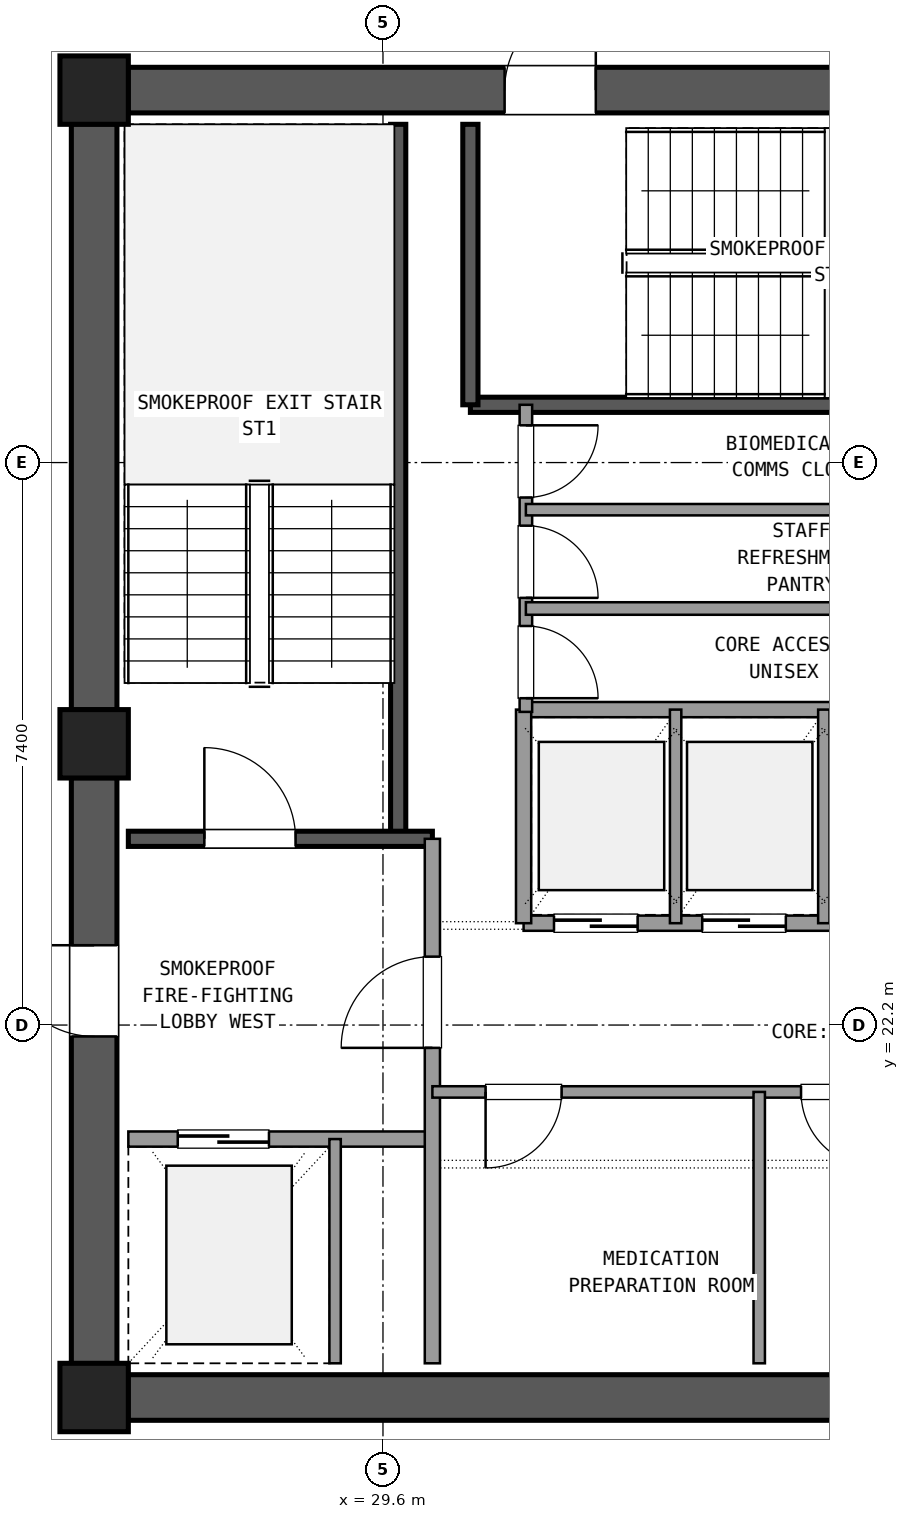
"""IFC4 building model, lengths in metres.
Left out: names, types, materials, properties, quantities, classifications, styles, units other than length and angle.
Written with IfcOpenShell. Run it as: python <this file> out.ifc"""

import sys

from ifc_helpers import new_model, si_unit, direction, frame, frame_2d, origin, origin_2d, place, context, subcontext, project, spatial, rectangle, extrude, element, fill, save


model = new_model("IFC4")
c1 = context("Model", 3, precision=1e-05, world=origin(), true_north=direction((0.0, 1.0)))
c2 = subcontext(c1, "Body", "Model", "MODEL_VIEW")
j1 = project(units=[si_unit("LENGTHUNIT", "METRE"), si_unit("PLANEANGLEUNIT", "RADIAN")], contexts=[c1])
p1 = place(None, origin())
s1 = spatial("IfcSite", under=j1, at=p1, CompositionType="ELEMENT")
p2 = place(p1, origin())
s2 = spatial("IfcBuilding", under=s1, at=p2, CompositionType="ELEMENT")
p3 = place(p2, frame((0.0, 0.0, 246.42)))
s3 = spatial("IfcBuildingStorey", under=s2, at=p3, CompositionType="ELEMENT", Elevation=246.42)
for number, where, z_axis, x_axis in (
    (1, (25.8, 17.3, 0.0), (0.0, 0.0, 1.0), (1.0, 0.0, 0.0)),
    (2, (25.8, 34.5, 0.0), (0.0, 0.0, 1.0), (1.0, 0.0, 0.0)),
    (3, (25.8, 25.9, 0.0), (0.0, 0.0, 1.0), (1.0, 0.0, 0.0)),
):
    element("IfcColumn", number, at=place(p3, frame(where, z_axis=z_axis, x_axis=x_axis)), inside=s3, PredefinedType="COLUMN", context=c2, shape_type="SweptSolid", body=[
        extrude(rectangle(XDim=0.9, YDim=0.9, at=origin_2d()), origin(), (0.0, 0.0, 1.0), 3.6),
    ])
p4 = place(p3, frame((26.245, 17.3, 0.0), z_axis=(0.0, 0.0, 1.0), x_axis=(1.0, 0.0, 0.0)))
e4 = element("IfcWall", 4, at=p4, inside=s3, PredefinedType="SHEAR", context=c2, shape_type="SweptSolid", body=[
    extrude(rectangle(XDim=10.31, YDim=0.6, at=frame_2d((5.155, 0.0))), origin(), (0.0, 0.0, 1.0), 3.32),
])
p5 = place(p3, frame((36.555, 34.5, 0.0), z_axis=(0.0, 0.0, 1.0), x_axis=(-1.0, 0.0, 0.0)))
e5 = element("IfcWall", 5, at=p5, inside=s3, PredefinedType="SHEAR", context=c2, shape_type="SweptSolid", body=[
    extrude(rectangle(XDim=10.31, YDim=0.6, at=frame_2d((5.155, 0.0))), origin(), (0.0, 0.0, 1.0), 3.32),
])
p6 = place(p5, frame((4.155, 0.0, 0.0)))
e6 = element("IfcOpeningElement", 6, at=p6, cuts=e5, PredefinedType="OPENING", context=c2, shape_type="SweptSolid", body=[
    extrude(rectangle(XDim=1.2, YDim=2.15, at=frame_2d((0.6, 1.075))), frame((0.0, 0.31, 0.0), z_axis=(0.0, -1.0, 0.0), x_axis=(1.0, 0.0, 0.0)), (0.0, 0.0, 1.0), 0.62),
])
p7 = place(p3, frame((25.8, 34.055, 0.0), z_axis=(0.0, 0.0, 1.0), x_axis=(0.0, -1.0, 0.0)))
e7 = element("IfcWall", 7, at=p7, inside=s3, PredefinedType="SHEAR", context=c2, shape_type="SweptSolid", body=[
    extrude(rectangle(XDim=7.71, YDim=0.6, at=frame_2d((3.855, 0.0))), origin(), (0.0, 0.0, 1.0), 3.32),
])
p8 = place(p3, frame((25.8, 25.455, 0.0), z_axis=(0.0, 0.0, 1.0), x_axis=(0.0, -1.0, 0.0)))
e8 = element("IfcWall", 8, at=p8, inside=s3, PredefinedType="SHEAR", context=c2, shape_type="SweptSolid", body=[
    extrude(rectangle(XDim=7.71, YDim=0.6, at=frame_2d((3.855, 0.0))), origin(), (0.0, 0.0, 1.0), 3.32),
])
p9 = place(p8, frame((2.205, 0.0, 0.0)))
e9 = element("IfcOpeningElement", 9, at=p9, cuts=e8, PredefinedType="OPENING", context=c2, shape_type="SweptSolid", body=[
    extrude(rectangle(XDim=1.2, YDim=2.15, at=frame_2d((0.6, 1.075))), frame((0.0, 0.31, 0.0), z_axis=(0.0, -1.0, 0.0), x_axis=(1.0, 0.0, 0.0)), (0.0, 0.0, 1.0), 0.62),
])
p10 = place(p3, frame((29.8, 24.65, 0.0), z_axis=(0.0, 0.0, 1.0), x_axis=(0.0, 1.0, 0.0)))
e10 = element("IfcWall", 10, at=p10, inside=s3, PredefinedType="SHEAR", context=c2, shape_type="SweptSolid", body=[
    extrude(rectangle(XDim=9.4, YDim=0.2, at=frame_2d((4.7, 0.0))), origin(), (0.0, 0.0, 1.0), 3.32),
])
p11 = place(p3, frame((26.25, 24.65, 0.0), z_axis=(0.0, 0.0, 1.0), x_axis=(1.0, 0.0, 0.0)))
e11 = element("IfcWall", 11, at=p11, inside=s3, PredefinedType="SHEAR", context=c2, shape_type="SweptSolid", body=[
    extrude(rectangle(XDim=4.0, YDim=0.2, at=frame_2d((2.0, 0.0))), origin(), (0.0, 0.0, 1.0), 3.32),
])
p12 = place(p11, frame((1.0, 0.0, 0.0)))
e12 = element("IfcOpeningElement", 12, at=p12, cuts=e11, PredefinedType="OPENING", context=c2, shape_type="SweptSolid", body=[
    extrude(rectangle(XDim=1.2, YDim=2.15, at=frame_2d((0.6, 1.075))), frame((0.0, 0.11, 0.0), z_axis=(0.0, -1.0, 0.0), x_axis=(1.0, 0.0, 0.0)), (0.0, 0.0, 1.0), 0.22),
])
p13 = place(p3, frame((30.75, 30.36, 0.0), z_axis=(0.0, 0.0, 1.0), x_axis=(1.0, 0.0, 0.0)))
e13 = element("IfcWall", 13, at=p13, inside=s3, PredefinedType="SHEAR", context=c2, shape_type="SweptSolid", body=[
    extrude(rectangle(XDim=9.5, YDim=0.2, at=frame_2d((4.75, 0.0))), origin(), (0.0, 0.0, 1.0), 3.32),
])
p14 = place(p3, frame((30.75, 30.36, 0.0), z_axis=(0.0, 0.0, 1.0), x_axis=(0.0, 1.0, 0.0)))
e14 = element("IfcWall", 14, at=p14, inside=s3, PredefinedType="SHEAR", context=c2, shape_type="SweptSolid", body=[
    extrude(rectangle(XDim=3.69, YDim=0.2, at=frame_2d((1.845, 0.0))), origin(), (0.0, 0.0, 1.0), 3.32),
])
p15 = place(p3, frame((26.25, 20.7, 0.0), z_axis=(0.0, 0.0, 1.0), x_axis=(1.0, 0.0, 0.0)))
e15 = element("IfcWall", 15, at=p15, inside=s3, PredefinedType="SOLIDWALL", context=c2, shape_type="SweptSolid", body=[
    extrude(rectangle(XDim=4.0, YDim=0.2, at=frame_2d((2.0, 0.0))), origin(), (0.0, 0.0, 1.0), 2.61),
])
p16 = place(p15, frame((0.65, 0.0, 0.0)))
e16 = element("IfcOpeningElement", 16, at=p16, cuts=e15, PredefinedType="OPENING", context=c2, shape_type="SweptSolid", body=[
    extrude(rectangle(XDim=1.2, YDim=2.15, at=frame_2d((0.6, 1.075))), frame((0.0, 0.11, 0.0), z_axis=(0.0, -1.0, 0.0), x_axis=(1.0, 0.0, 0.0)), (0.0, 0.0, 1.0), 0.22),
])
p17 = place(p3, frame((30.25, 17.75, 0.0), z_axis=(0.0, 0.0, 1.0), x_axis=(0.0, 1.0, 0.0)))
e17 = element("IfcWall", 17, at=p17, inside=s3, PredefinedType="SOLIDWALL", context=c2, shape_type="SweptSolid", body=[
    extrude(rectangle(XDim=6.9, YDim=0.2, at=frame_2d((3.45, 0.0))), origin(), (0.0, 0.0, 1.0), 2.61),
])
p18 = place(p17, frame((4.15, 0.0, 0.0)))
e18 = element("IfcOpeningElement", 18, at=p18, cuts=e17, PredefinedType="OPENING", context=c2, shape_type="SweptSolid", body=[
    extrude(rectangle(XDim=1.2, YDim=2.15, at=frame_2d((0.6, 1.075))), frame((0.0, 0.11, 0.0), z_axis=(0.0, -1.0, 0.0), x_axis=(1.0, 0.0, 0.0)), (0.0, 0.0, 1.0), 0.22),
])
p19 = place(p3, frame((28.97, 17.75, 0.0), z_axis=(0.0, 0.0, 1.0), x_axis=(0.0, 1.0, 0.0)))
e19 = element("IfcWall", 19, at=p19, inside=s3, PredefinedType="PARTITIONING", context=c2, shape_type="SweptSolid", body=[
    extrude(rectangle(XDim=2.95, YDim=0.15, at=frame_2d((1.475, 0.0))), origin(), (0.0, 0.0, 1.0), 2.61),
])
p20 = place(p3, frame((30.25, 21.32, 0.0), z_axis=(0.0, 0.0, 1.0), x_axis=(1.0, 0.0, 0.0)))
e20 = element("IfcWall", 20, at=p20, inside=s3, PredefinedType="PARTITIONING", context=c2, shape_type="SweptSolid", body=[
    extrude(rectangle(XDim=7.0, YDim=0.15, at=frame_2d((3.5, 0.0))), origin(), (0.0, 0.0, 1.0), 2.61),
])
p21 = place(p20, frame((0.7, 0.0, 0.0)))
e21 = element("IfcOpeningElement", 21, at=p21, cuts=e20, PredefinedType="OPENING", context=c2, shape_type="SweptSolid", body=[
    extrude(rectangle(XDim=1.0, YDim=2.15, at=frame_2d((0.5, 1.075))), frame((0.0, 0.085, 0.0), z_axis=(0.0, -1.0, 0.0), x_axis=(1.0, 0.0, 0.0)), (0.0, 0.0, 1.0), 0.17),
])
p22 = place(p20, frame((4.85, 0.0, 0.0)))
e22 = element("IfcOpeningElement", 22, at=p22, cuts=e20, PredefinedType="OPENING", context=c2, shape_type="SweptSolid", body=[
    extrude(rectangle(XDim=1.0, YDim=2.15, at=frame_2d((0.5, 1.075))), frame((0.0, 0.085, 0.0), z_axis=(0.0, -1.0, 0.0), x_axis=(1.0, 0.0, 0.0)), (0.0, 0.0, 1.0), 0.17),
])
p23 = place(p3, frame((34.55, 17.75, 0.0), z_axis=(0.0, 0.0, 1.0), x_axis=(0.0, 1.0, 0.0)))
e23 = element("IfcWall", 23, at=p23, inside=s3, PredefinedType="PARTITIONING", context=c2, shape_type="SweptSolid", body=[
    extrude(rectangle(XDim=3.57, YDim=0.15, at=frame_2d((1.785, 0.0))), origin(), (0.0, 0.0, 1.0), 2.61),
])
p24 = place(p3, frame((31.45, 23.54, 0.0), z_axis=(0.0, 0.0, 1.0), x_axis=(1.0, 0.0, 0.0)))
e24 = element("IfcWall", 24, at=p24, inside=s3, PredefinedType="SOLIDWALL", context=c2, shape_type="SweptSolid", body=[
    extrude(rectangle(XDim=5.9, YDim=0.2, at=frame_2d((2.95, 0.0))), origin(), (0.0, 0.0, 1.0), 2.61),
])
p25 = place(p24, frame((0.4, 0.0, 0.0)))
e25 = element("IfcOpeningElement", 25, at=p25, cuts=e24, PredefinedType="OPENING", context=c2, shape_type="SweptSolid", body=[
    extrude(rectangle(XDim=1.1, YDim=2.15, at=frame_2d((0.55, 1.075))), frame((0.0, 0.11, 0.0), z_axis=(0.0, -1.0, 0.0), x_axis=(1.0, 0.0, 0.0)), (0.0, 0.0, 1.0), 0.22),
])
p26 = place(p24, frame((2.35, 0.0, 0.0)))
e26 = element("IfcOpeningElement", 26, at=p26, cuts=e24, PredefinedType="OPENING", context=c2, shape_type="SweptSolid", body=[
    extrude(rectangle(XDim=1.1, YDim=2.15, at=frame_2d((0.55, 1.075))), frame((0.0, 0.11, 0.0), z_axis=(0.0, -1.0, 0.0), x_axis=(1.0, 0.0, 0.0)), (0.0, 0.0, 1.0), 0.22),
])
p27 = place(p24, frame((4.3, 0.0, 0.0)))
e27 = element("IfcOpeningElement", 27, at=p27, cuts=e24, PredefinedType="OPENING", context=c2, shape_type="SweptSolid", body=[
    extrude(rectangle(XDim=1.1, YDim=2.15, at=frame_2d((0.55, 1.075))), frame((0.0, 0.11, 0.0), z_axis=(0.0, -1.0, 0.0), x_axis=(1.0, 0.0, 0.0)), (0.0, 0.0, 1.0), 0.22),
])
p28 = place(p3, frame((31.45, 26.35, 0.0), z_axis=(0.0, 0.0, 1.0), x_axis=(1.0, 0.0, 0.0)))
e28 = element("IfcWall", 28, at=p28, inside=s3, PredefinedType="SOLIDWALL", context=c2, shape_type="SweptSolid", body=[
    extrude(rectangle(XDim=5.9, YDim=0.2, at=frame_2d((2.95, 0.0))), origin(), (0.0, 0.0, 1.0), 2.61),
])
p29 = place(p3, frame((31.45, 23.54, 0.0), z_axis=(0.0, 0.0, 1.0), x_axis=(0.0, 1.0, 0.0)))
e29 = element("IfcWall", 29, at=p29, inside=s3, PredefinedType="SOLIDWALL", context=c2, shape_type="SweptSolid", body=[
    extrude(rectangle(XDim=2.81, YDim=0.2, at=frame_2d((1.405, 0.0))), origin(), (0.0, 0.0, 1.0), 2.61),
])
for number, where, z_axis, x_axis in (
    (30, (33.45, 23.54, 0.0), (0.0, 0.0, 1.0), (0.0, 1.0, 0.0)),
    (31, (35.4, 23.54, 0.0), (0.0, 0.0, 1.0), (0.0, 1.0, 0.0)),
):
    element("IfcWall", number, at=place(p3, frame(where, z_axis=z_axis, x_axis=x_axis)), inside=s3, PredefinedType="PARTITIONING", context=c2, shape_type="SweptSolid", body=[
        extrude(rectangle(XDim=2.81, YDim=0.15, at=frame_2d((1.405, 0.0))), origin(), (0.0, 0.0, 1.0), 2.61),
    ])
p30 = place(p3, frame((31.48, 26.32, 0.0), z_axis=(0.0, 0.0, 1.0), x_axis=(0.0, 1.0, 0.0)))
e32 = element("IfcWall", 32, at=p30, inside=s3, PredefinedType="PLUMBINGWALL", context=c2, shape_type="SweptSolid", body=[
    extrude(rectangle(XDim=4.04, YDim=0.165, at=frame_2d((2.02, 0.0))), origin(), (0.0, 0.0, 1.0), 2.61),
])
p31 = place(p30, frame((0.18, 0.0, 0.0)))
e33 = element("IfcOpeningElement", 33, at=p31, cuts=e32, PredefinedType="OPENING", context=c2, shape_type="SweptSolid", body=[
    extrude(rectangle(XDim=0.95, YDim=2.1, at=frame_2d((0.475, 1.05))), frame((0.0, 0.093, 0.0), z_axis=(0.0, -1.0, 0.0), x_axis=(1.0, 0.0, 0.0)), (0.0, 0.0, 1.0), 0.185),
])
p32 = place(p30, frame((1.5, 0.0, 0.0)))
e34 = element("IfcOpeningElement", 34, at=p32, cuts=e32, PredefinedType="OPENING", context=c2, shape_type="SweptSolid", body=[
    extrude(rectangle(XDim=0.95, YDim=2.1, at=frame_2d((0.475, 1.05))), frame((0.0, 0.093, 0.0), z_axis=(0.0, -1.0, 0.0), x_axis=(1.0, 0.0, 0.0)), (0.0, 0.0, 1.0), 0.185),
])
p33 = place(p30, frame((2.82, 0.0, 0.0)))
e35 = element("IfcOpeningElement", 35, at=p33, cuts=e32, PredefinedType="OPENING", context=c2, shape_type="SweptSolid", body=[
    extrude(rectangle(XDim=0.95, YDim=2.1, at=frame_2d((0.475, 1.05))), frame((0.0, 0.093, 0.0), z_axis=(0.0, -1.0, 0.0), x_axis=(1.0, 0.0, 0.0)), (0.0, 0.0, 1.0), 0.185),
])
p34 = place(p3, frame((31.48, 27.68, 0.0), z_axis=(0.0, 0.0, 1.0), x_axis=(1.0, 0.0, 0.0)))
e36 = element("IfcWall", 36, at=p34, inside=s3, PredefinedType="PLUMBINGWALL", context=c2, shape_type="SweptSolid", body=[
    extrude(rectangle(XDim=5.87, YDim=0.165, at=frame_2d((2.935, 0.0))), origin(), (0.0, 0.0, 1.0), 2.61),
])
p35 = place(p3, frame((31.48, 28.98, 0.0), z_axis=(0.0, 0.0, 1.0), x_axis=(1.0, 0.0, 0.0)))
e37 = element("IfcWall", 37, at=p35, inside=s3, PredefinedType="PARTITIONING", context=c2, shape_type="SweptSolid", body=[
    extrude(rectangle(XDim=5.89, YDim=0.15, at=frame_2d((2.945, 0.0))), origin(), (0.0, 0.0, 1.0), 2.61),
])
p36 = place(p12, origin())
e38 = element("IfcDoor", 38, at=p36, inside=s3, OperationType="SINGLE_SWING_LEFT", PredefinedType="DOOR", context=c2, shape_type="SweptSolid", body=[
    extrude(rectangle(XDim=1.2, YDim=2.15, at=frame_2d((0.6, 1.075))), frame((0.0, 0.025, 0.0), z_axis=(0.0, -1.0, 0.0), x_axis=(1.0, 0.0, 0.0)), (0.0, 0.0, 1.0), 0.05),
])
fill(e12, e38)
p37 = place(p16, origin())
e39 = element("IfcDoor", 39, at=p37, inside=s3, OperationType="SLIDING_TO_LEFT", PredefinedType="DOOR", context=c2, shape_type="SweptSolid", body=[
    extrude(rectangle(XDim=1.2, YDim=2.15, at=frame_2d((0.6, 1.075))), frame((0.0, 0.025, 0.0), z_axis=(0.0, -1.0, 0.0), x_axis=(1.0, 0.0, 0.0)), (0.0, 0.0, 1.0), 0.05),
])
fill(e16, e39)
p38 = place(p18, origin())
e40 = element("IfcDoor", 40, at=p38, inside=s3, OperationType="SINGLE_SWING_LEFT", PredefinedType="DOOR", context=c2, shape_type="SweptSolid", body=[
    extrude(rectangle(XDim=1.2, YDim=2.15, at=frame_2d((0.6, 1.075))), frame((0.0, 0.025, 0.0), z_axis=(0.0, -1.0, 0.0), x_axis=(1.0, 0.0, 0.0)), (0.0, 0.0, 1.0), 0.05),
])
fill(e18, e40)
p39 = place(p9, frame((1.2, 0.0, 0.0), z_axis=(0.0, 0.0, 1.0), x_axis=(-1.0, 0.0, 0.0)))
e41 = element("IfcDoor", 41, at=p39, inside=s3, OperationType="SINGLE_SWING_LEFT", PredefinedType="DOOR", context=c2, shape_type="SweptSolid", body=[
    extrude(rectangle(XDim=1.2, YDim=2.15, at=frame_2d((0.6, 1.075))), frame((0.0, 0.025, 0.0), z_axis=(0.0, -1.0, 0.0), x_axis=(1.0, 0.0, 0.0)), (0.0, 0.0, 1.0), 0.05),
])
fill(e9, e41)
p40 = place(p6, frame((1.2, 0.0, 0.0), z_axis=(0.0, 0.0, 1.0), x_axis=(-1.0, 0.0, 0.0)))
e42 = element("IfcDoor", 42, at=p40, inside=s3, OperationType="SINGLE_SWING_LEFT", PredefinedType="DOOR", context=c2, shape_type="SweptSolid", body=[
    extrude(rectangle(XDim=1.2, YDim=2.15, at=frame_2d((0.6, 1.075))), frame((0.0, 0.025, 0.0), z_axis=(0.0, -1.0, 0.0), x_axis=(1.0, 0.0, 0.0)), (0.0, 0.0, 1.0), 0.05),
])
fill(e6, e42)
p41 = place(p21, frame((1.0, 0.0, 0.0), z_axis=(0.0, 0.0, 1.0), x_axis=(-1.0, 0.0, 0.0)))
e43 = element("IfcDoor", 43, at=p41, inside=s3, OperationType="SINGLE_SWING_LEFT", PredefinedType="DOOR", context=c2, shape_type="SweptSolid", body=[
    extrude(rectangle(XDim=1.0, YDim=2.15, at=frame_2d((0.5, 1.075))), frame((0.0, 0.025, 0.0), z_axis=(0.0, -1.0, 0.0), x_axis=(1.0, 0.0, 0.0)), (0.0, 0.0, 1.0), 0.05),
])
fill(e21, e43)
p42 = place(p22, frame((1.0, 0.0, 0.0), z_axis=(0.0, 0.0, 1.0), x_axis=(-1.0, 0.0, 0.0)))
e44 = element("IfcDoor", 44, at=p42, inside=s3, OperationType="SINGLE_SWING_RIGHT", PredefinedType="DOOR", context=c2, shape_type="SweptSolid", body=[
    extrude(rectangle(XDim=1.0, YDim=2.15, at=frame_2d((0.5, 1.075))), frame((0.0, 0.025, 0.0), z_axis=(0.0, -1.0, 0.0), x_axis=(1.0, 0.0, 0.0)), (0.0, 0.0, 1.0), 0.05),
])
fill(e22, e44)
p43 = place(p25, origin())
e45 = element("IfcDoor", 45, at=p43, inside=s3, OperationType="SLIDING_TO_RIGHT", PredefinedType="DOOR", context=c2, shape_type="SweptSolid", body=[
    extrude(rectangle(XDim=1.1, YDim=2.15, at=frame_2d((0.55, 1.075))), frame((0.0, 0.025, 0.0), z_axis=(0.0, -1.0, 0.0), x_axis=(1.0, 0.0, 0.0)), (0.0, 0.0, 1.0), 0.05),
])
fill(e25, e45)
p44 = place(p26, origin())
e46 = element("IfcDoor", 46, at=p44, inside=s3, OperationType="SLIDING_TO_RIGHT", PredefinedType="DOOR", context=c2, shape_type="SweptSolid", body=[
    extrude(rectangle(XDim=1.1, YDim=2.15, at=frame_2d((0.55, 1.075))), frame((0.0, 0.025, 0.0), z_axis=(0.0, -1.0, 0.0), x_axis=(1.0, 0.0, 0.0)), (0.0, 0.0, 1.0), 0.05),
])
fill(e26, e46)
p45 = place(p31, frame((0.95, 0.0, 0.0), z_axis=(0.0, 0.0, 1.0), x_axis=(-1.0, 0.0, 0.0)))
e47 = element("IfcDoor", 47, at=p45, inside=s3, OperationType="SINGLE_SWING_LEFT", PredefinedType="DOOR", context=c2, shape_type="SweptSolid", body=[
    extrude(rectangle(XDim=0.95, YDim=2.1, at=frame_2d((0.475, 1.05))), frame((0.0, 0.025, 0.0), z_axis=(0.0, -1.0, 0.0), x_axis=(1.0, 0.0, 0.0)), (0.0, 0.0, 1.0), 0.05),
])
fill(e33, e47)
p46 = place(p32, frame((0.95, 0.0, 0.0), z_axis=(0.0, 0.0, 1.0), x_axis=(-1.0, 0.0, 0.0)))
e48 = element("IfcDoor", 48, at=p46, inside=s3, OperationType="SINGLE_SWING_LEFT", PredefinedType="DOOR", context=c2, shape_type="SweptSolid", body=[
    extrude(rectangle(XDim=0.95, YDim=2.1, at=frame_2d((0.475, 1.05))), frame((0.0, 0.025, 0.0), z_axis=(0.0, -1.0, 0.0), x_axis=(1.0, 0.0, 0.0)), (0.0, 0.0, 1.0), 0.05),
])
fill(e34, e48)
p47 = place(p33, frame((0.95, 0.0, 0.0), z_axis=(0.0, 0.0, 1.0), x_axis=(-1.0, 0.0, 0.0)))
e49 = element("IfcDoor", 49, at=p47, inside=s3, OperationType="SINGLE_SWING_RIGHT", PredefinedType="DOOR", context=c2, shape_type="SweptSolid", body=[
    extrude(rectangle(XDim=0.95, YDim=2.1, at=frame_2d((0.475, 1.05))), frame((0.0, 0.025, 0.0), z_axis=(0.0, -1.0, 0.0), x_axis=(1.0, 0.0, 0.0)), (0.0, 0.0, 1.0), 0.05),
])
fill(e35, e49)
save(model, sys.argv[1])
